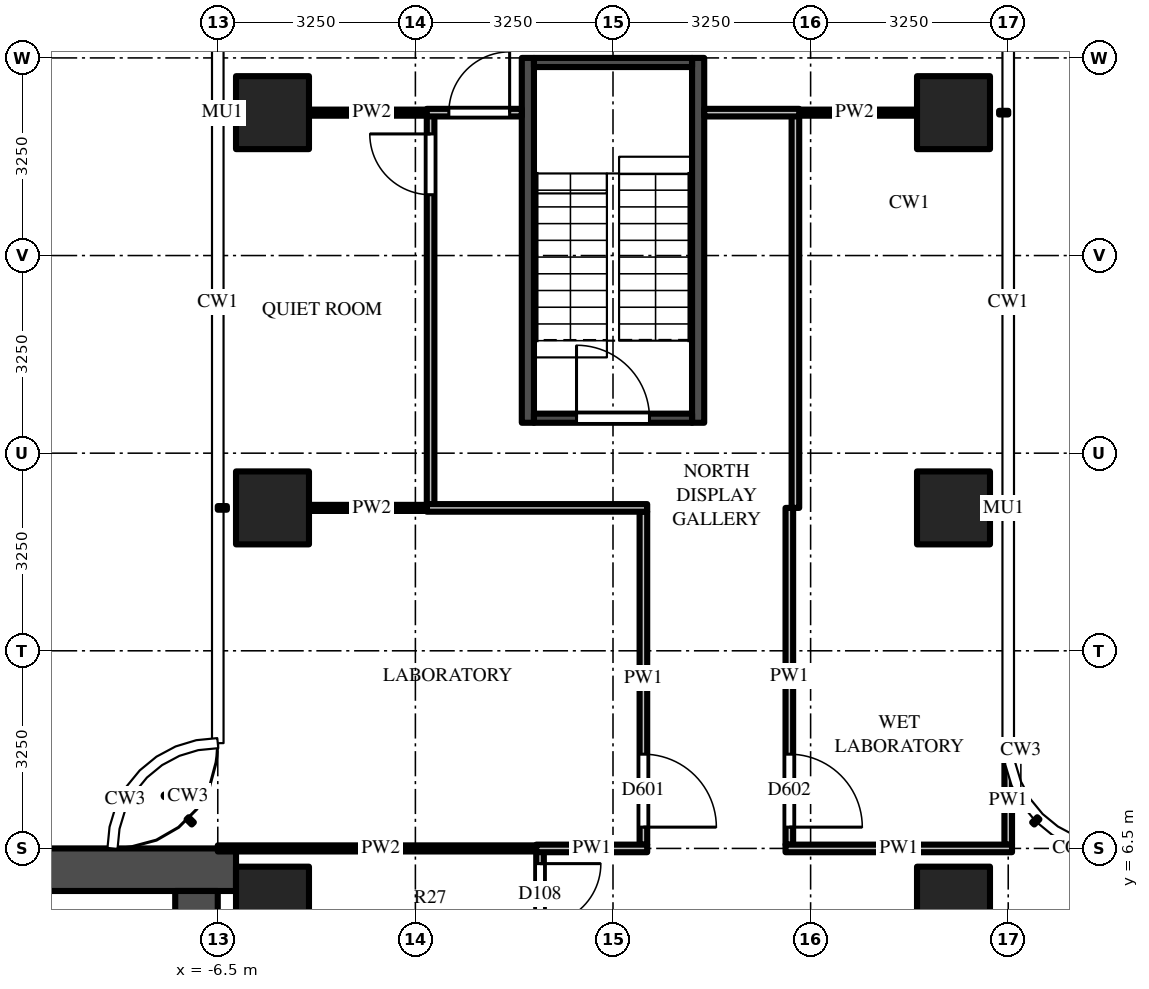
"""IFC4 building model, lengths in metres.
Left out: names, types, materials, properties, quantities, classifications, styles, units other than length and angle.
Written with IfcOpenShell. Run it as: python <this file> out.ifc"""

import sys

from ifc_helpers import new_model, si_unit, direction, frame, frame_2d, origin, origin_2d, place, context, subcontext, project, spatial, rectangle, extrude, source, transform, mapped, element, fill, save


model = new_model("IFC4")
c1 = context("Model", 3, precision=1e-05, world=origin(), true_north=direction((0.0, 1.0)))
c2 = subcontext(c1, "Body", "Model", "MODEL_VIEW")
j1 = project(units=[si_unit("LENGTHUNIT", "METRE"), si_unit("PLANEANGLEUNIT", "RADIAN")], contexts=[c1])
p1 = place(None, origin())
s1 = spatial("IfcSite", under=j1, at=p1, CompositionType="ELEMENT")
p2 = place(p1, origin())
s2 = spatial("IfcBuilding", under=s1, at=p2, CompositionType="ELEMENT")
p3 = place(p2, frame((0.0, 0.0, 165.9)))
s3 = spatial("IfcBuildingStorey", under=s2, at=p3, CompositionType="ELEMENT", Elevation=165.9)
m1 = source(origin(), c2, "Body", "SweptSolid", [
    extrude(rectangle(XDim=1.2, YDim=1.2, at=origin_2d()), origin(), (0.0, 0.0, 1.0), 3.9),
])
for number, where, z_axis, x_axis in (
    (1, (-5.6, 12.1, 0.0), (0.0, 0.0, 1.0), (1.0, 0.0, 0.0)),
    (2, (-5.6, 18.6, 0.0), (0.0, 0.0, 1.0), (1.0, 0.0, 0.0)),
    (3, (5.6, 12.1, 0.0), (0.0, 0.0, 1.0), (1.0, 0.0, 0.0)),
    (4, (5.6, 18.6, 0.0), (0.0, 0.0, 1.0), (1.0, 0.0, 0.0)),
    (5, (5.6, 5.6, 0.0), (0.0, 0.0, 1.0), (1.0, 0.0, 0.0)),
    (6, (-5.6, 5.6, 0.0), (0.0, 0.0, 1.0), (1.0, 0.0, 0.0)),
):
    element("IfcColumn", number, at=place(p3, frame(where, z_axis=z_axis, x_axis=x_axis)), inside=s3, PredefinedType="COLUMN", context=c2, shape_type="MappedRepresentation", body=[
        mapped(m1, transform((0.0, 0.0, 0.0))),
    ])
m2 = source(origin(), c2, "Body", "SweptSolid", [
    extrude(rectangle(XDim=16.55, YDim=0.7, at=frame_2d((8.275, 0.0))), origin(), (0.0, 0.0, 1.0), 3.7),
])
p4 = place(p3, frame((-6.2, 6.15, 0.0), z_axis=(0.0, 0.0, 1.0), x_axis=(-1.0, 0.0, 0.0)))
e7 = element("IfcWall", 7, at=p4, inside=s3, PredefinedType="SHEAR", context=c2, shape_type="MappedRepresentation", body=[
    mapped(m2, transform((0.0, 0.0, 0.0))),
])
m3 = source(origin(), c2, "Body", "SweptSolid", [
    extrude(rectangle(XDim=9.05, YDim=0.7, at=frame_2d((4.525, 0.0))), origin(), (0.0, 0.0, 1.0), 3.7),
])
p5 = place(p3, frame((-6.85, 5.8, 0.0), z_axis=(0.0, 0.0, 1.0), x_axis=(0.0, -1.0, 0.0)))
e8 = element("IfcWall", 8, at=p5, inside=s3, PredefinedType="SHEAR", context=c2, shape_type="MappedRepresentation", body=[
    mapped(m3, transform((0.0, 0.0, 0.0))),
])
m4 = source(origin(), c2, "Body", "SweptSolid", [
    extrude(rectangle(XDim=1.8, YDim=2.1, at=frame_2d((0.9, 1.05))), frame((0.0, 0.36, 0.0), z_axis=(0.0, -1.0, 0.0), x_axis=(1.0, 0.0, 0.0)), (0.0, 0.0, 1.0), 0.72),
])
p6 = place(p5, frame((3.15, 0.0, 0.0)))
e9 = element("IfcOpeningElement", 9, at=p6, cuts=e8, PredefinedType="OPENING", context=c2, shape_type="MappedRepresentation", body=[
    mapped(m4, transform((0.0, 0.0, 0.0))),
])
m5 = source(origin(), c2, "Body", "SweptSolid", [
    extrude(rectangle(XDim=6.0, YDim=0.2, at=frame_2d((3.0, 0.0))), origin(), (0.0, 0.0, 1.0), 3.7),
])
for number, where, z_axis, x_axis in (
    (10, (-1.4, 13.5, 0.0), (0.0, 0.0, 1.0), (0.0, 1.0, 0.0)),
    (11, (1.4, 13.5, 0.0), (0.0, 0.0, 1.0), (0.0, 1.0, 0.0)),
):
    element("IfcWall", number, at=place(p3, frame(where, z_axis=z_axis, x_axis=x_axis)), inside=s3, PredefinedType="SHEAR", context=c2, shape_type="MappedRepresentation", body=[
        mapped(m5, transform((0.0, 0.0, 0.0))),
    ])
m6 = source(origin(), c2, "Body", "SweptSolid", [
    extrude(rectangle(XDim=2.6, YDim=0.15, at=frame_2d((1.3, 0.0))), origin(), (0.0, 0.0, 1.0), 3.7),
])
p7 = place(p3, frame((-1.3, 13.575, 0.0), z_axis=(0.0, 0.0, 1.0), x_axis=(1.0, 0.0, 0.0)))
e12 = element("IfcWall", 12, at=p7, inside=s3, PredefinedType="SHEAR", context=c2, shape_type="MappedRepresentation", body=[
    mapped(m6, transform((0.0, 0.0, 0.0))),
])
m7 = source(origin(), c2, "Body", "SweptSolid", [
    extrude(rectangle(XDim=1.2, YDim=2.1, at=frame_2d((0.6, 1.05))), frame((0.0, 0.085, 0.0), z_axis=(0.0, -1.0, 0.0), x_axis=(1.0, 0.0, 0.0)), (0.0, 0.0, 1.0), 0.17),
])
p8 = place(p7, frame((0.7, 0.0, 0.0)))
e13 = element("IfcOpeningElement", 13, at=p8, cuts=e12, PredefinedType="OPENING", context=c2, shape_type="MappedRepresentation", body=[
    mapped(m7, transform((0.0, 0.0, 0.0))),
])
p9 = place(p3, frame((-1.3, 19.425, 0.0), z_axis=(0.0, 0.0, 1.0), x_axis=(1.0, 0.0, 0.0)))
e14 = element("IfcWall", 14, at=p9, inside=s3, PredefinedType="SHEAR", context=c2, shape_type="MappedRepresentation", body=[
    mapped(m6, transform((0.0, 0.0, 0.0))),
])
m8 = source(origin(), c2, "Body", "SweptSolid", [
    extrude(rectangle(XDim=6.4, YDim=0.125, at=frame_2d((3.2, 0.0))), origin(), (0.0, 0.0, 1.0), 2.997),
])
p10 = place(p3, frame((-3.0, 12.15, 0.0), z_axis=(0.0, 0.0, 1.0), x_axis=(0.0, 1.0, 0.0)))
e15 = element("IfcWall", 15, at=p10, inside=s3, PredefinedType="PARTITIONING", context=c2, shape_type="MappedRepresentation", body=[
    mapped(m8, transform((0.0, 0.0, 0.0))),
])
m9 = source(origin(), c2, "Body", "SweptSolid", [
    extrude(rectangle(XDim=1.0, YDim=2.1, at=frame_2d((0.5, 1.05))), frame((0.0, 0.073, 0.0), z_axis=(0.0, -1.0, 0.0), x_axis=(1.0, 0.0, 0.0)), (0.0, 0.0, 1.0), 0.145),
])
p11 = place(p10, frame((5.1, 0.0, 0.0)))
e16 = element("IfcOpeningElement", 16, at=p11, cuts=e15, PredefinedType="OPENING", context=c2, shape_type="MappedRepresentation", body=[
    mapped(m9, transform((0.0, 0.0, 0.0))),
])
m10 = source(origin(), c2, "Body", "SweptSolid", [
    extrude(rectangle(XDim=3.137, YDim=0.125, at=frame_2d((1.569, 0.0))), origin(), (0.0, 0.0, 1.0), 2.997),
])
p12 = place(p3, frame((-1.2, 6.45, 0.0), z_axis=(0.0, 0.0, 1.0), x_axis=(0.0, -1.0, 0.0)))
e17 = element("IfcWall", 17, at=p12, inside=s3, PredefinedType="PARTITIONING", context=c2, shape_type="MappedRepresentation", body=[
    mapped(m10, transform((0.0, 0.0, 0.0))),
])
p13 = place(p12, frame((0.2, 0.0, 0.0)))
e18 = element("IfcOpeningElement", 18, at=p13, cuts=e17, PredefinedType="OPENING", context=c2, shape_type="MappedRepresentation", body=[
    mapped(m9, transform((0.0, 0.0, 0.0))),
])
m11 = source(origin(), c2, "Body", "SweptSolid", [
    extrude(rectangle(XDim=5.475, YDim=0.125, at=frame_2d((2.738, 0.0))), origin(), (0.0, 0.0, 1.0), 2.997),
])
p14 = place(p3, frame((0.5, 12.038, 0.0), z_axis=(0.0, 0.0, 1.0), x_axis=(0.0, -1.0, 0.0)))
e19 = element("IfcWall", 19, at=p14, inside=s3, PredefinedType="PARTITIONING", context=c2, shape_type="MappedRepresentation", body=[
    mapped(m11, transform((0.0, 0.0, 0.0))),
])
m12 = source(origin(), c2, "Body", "SweptSolid", [
    extrude(rectangle(XDim=1.2, YDim=2.1, at=frame_2d((0.6, 1.05))), frame((0.0, 0.073, 0.0), z_axis=(0.0, -1.0, 0.0), x_axis=(1.0, 0.0, 0.0)), (0.0, 0.0, 1.0), 0.145),
])
p15 = place(p14, frame((3.988, 0.0, 0.0)))
e20 = element("IfcOpeningElement", 20, at=p15, cuts=e19, PredefinedType="OPENING", context=c2, shape_type="MappedRepresentation", body=[
    mapped(m12, transform((0.0, 0.0, 0.0))),
])
m13 = source(origin(), c2, "Body", "SweptSolid", [
    extrude(rectangle(XDim=5.538, YDim=0.125, at=frame_2d((2.769, 0.0))), origin(), (0.0, 0.0, 1.0), 2.997),
])
p16 = place(p3, frame((2.9, 12.1, 0.0), z_axis=(0.0, 0.0, 1.0), x_axis=(0.0, -1.0, 0.0)))
e21 = element("IfcWall", 21, at=p16, inside=s3, PredefinedType="PARTITIONING", context=c2, shape_type="MappedRepresentation", body=[
    mapped(m13, transform((0.0, 0.0, 0.0))),
])
p17 = place(p16, frame((4.05, 0.0, 0.0)))
e22 = element("IfcOpeningElement", 22, at=p17, cuts=e21, PredefinedType="OPENING", context=c2, shape_type="MappedRepresentation", body=[
    mapped(m12, transform((0.0, 0.0, 0.0))),
])
m14 = source(origin(), c2, "Body", "SweptSolid", [
    extrude(rectangle(XDim=6.45, YDim=0.125, at=frame_2d((3.225, 0.0))), origin(), (0.0, 0.0, 1.0), 2.997),
])
p18 = place(p3, frame((3.0, 18.55, 0.0), z_axis=(0.0, 0.0, 1.0), x_axis=(0.0, -1.0, 0.0)))
e23 = element("IfcWall", 23, at=p18, inside=s3, PredefinedType="PARTITIONING", context=c2, shape_type="MappedRepresentation", body=[
    mapped(m14, transform((0.0, 0.0, 0.0))),
])
m15 = source(origin(), c2, "Body", "SweptSolid", [
    extrude(rectangle(XDim=1.469, YDim=0.125, at=frame_2d((0.734, 0.0))), origin(), (0.0, 0.0, 1.0), 3.7),
])
p19 = place(p3, frame((6.5, 6.562, 0.0), z_axis=(0.0, 0.0, 1.0), x_axis=(0.0, 1.0, 0.0)))
e24 = element("IfcWall", 24, at=p19, inside=s3, PredefinedType="PARTITIONING", context=c2, shape_type="MappedRepresentation", body=[
    mapped(m15, transform((0.0, 0.0, 0.0))),
])
m16 = source(origin(), c2, "Body", "SweptSolid", [
    extrude(rectangle(XDim=5.363, YDim=0.1, at=frame_2d((2.681, 0.0))), origin(), (0.0, 0.0, 1.0), 2.78),
])
p20 = place(p3, frame((-6.5, 6.5, 0.0), z_axis=(0.0, 0.0, 1.0), x_axis=(1.0, 0.0, 0.0)))
e25 = element("IfcWall", 25, at=p20, inside=s3, PredefinedType="PARTITIONING", context=c2, shape_type="MappedRepresentation", body=[
    mapped(m16, transform((0.0, 0.0, 0.0))),
])
m17 = source(origin(), c2, "Body", "SweptSolid", [
    extrude(rectangle(XDim=1.825, YDim=0.125, at=frame_2d((0.913, 0.0))), origin(), (0.0, 0.0, 1.0), 3.7),
])
p21 = place(p3, frame((-1.262, 6.5, 0.0), z_axis=(0.0, 0.0, 1.0), x_axis=(1.0, 0.0, 0.0)))
e26 = element("IfcWall", 26, at=p21, inside=s3, PredefinedType="PARTITIONING", context=c2, shape_type="MappedRepresentation", body=[
    mapped(m17, transform((0.0, 0.0, 0.0))),
])
m18 = source(origin(), c2, "Body", "SweptSolid", [
    extrude(rectangle(XDim=3.725, YDim=0.125, at=frame_2d((1.863, 0.0))), origin(), (0.0, 0.0, 1.0), 2.78),
])
p22 = place(p3, frame((2.837, 6.5, 0.0), z_axis=(0.0, 0.0, 1.0), x_axis=(1.0, 0.0, 0.0)))
e27 = element("IfcWall", 27, at=p22, inside=s3, PredefinedType="PARTITIONING", context=c2, shape_type="MappedRepresentation", body=[
    mapped(m18, transform((0.0, 0.0, 0.0))),
])
m19 = source(origin(), c2, "Body", "SweptSolid", [
    extrude(rectangle(XDim=2.062, YDim=0.1, at=frame_2d((1.031, 0.0))), origin(), (0.0, 0.0, 1.0), 2.997),
])
p23 = place(p3, frame((-5.0, 12.1, 0.0), z_axis=(0.0, 0.0, 1.0), x_axis=(1.0, 0.0, 0.0)))
e28 = element("IfcWall", 28, at=p23, inside=s3, PredefinedType="PARTITIONING", context=c2, shape_type="MappedRepresentation", body=[
    mapped(m19, transform((0.0, 0.0, 0.0))),
])
m20 = source(origin(), c2, "Body", "SweptSolid", [
    extrude(rectangle(XDim=3.625, YDim=0.125, at=frame_2d((1.812, 0.0))), origin(), (0.0, 0.0, 1.0), 2.997),
])
p24 = place(p3, frame((0.562, 12.1, 0.0), z_axis=(0.0, 0.0, 1.0), x_axis=(-1.0, 0.0, 0.0)))
e29 = element("IfcWall", 29, at=p24, inside=s3, PredefinedType="PARTITIONING", context=c2, shape_type="MappedRepresentation", body=[
    mapped(m20, transform((0.0, 0.0, 0.0))),
])
m21 = source(origin(), c2, "Body", "SweptSolid", [
    extrude(rectangle(XDim=2.062, YDim=0.1, at=frame_2d((1.031, 0.0))), origin(), (0.0, 0.0, 1.0), 3.223),
])
for number, where, z_axis, x_axis in (
    (30, (-5.0, 18.6, 0.0), (0.0, 0.0, 1.0), (1.0, 0.0, 0.0)),
    (31, (2.938, 18.6, 0.0), (0.0, 0.0, 1.0), (1.0, 0.0, 0.0)),
):
    element("IfcWall", number, at=place(p3, frame(where, z_axis=z_axis, x_axis=x_axis)), inside=s3, PredefinedType="PARTITIONING", context=c2, shape_type="MappedRepresentation", body=[
        mapped(m21, transform((0.0, 0.0, 0.0))),
    ])
m22 = source(origin(), c2, "Body", "SweptSolid", [
    extrude(rectangle(XDim=1.562, YDim=0.125, at=frame_2d((0.781, 0.0))), origin(), (0.0, 0.0, 1.0), 3.223),
])
p25 = place(p3, frame((-3.062, 18.6, 0.0), z_axis=(0.0, 0.0, 1.0), x_axis=(1.0, 0.0, 0.0)))
e32 = element("IfcWall", 32, at=p25, inside=s3, PredefinedType="PARTITIONING", context=c2, shape_type="MappedRepresentation", body=[
    mapped(m22, transform((0.0, 0.0, 0.0))),
])
p26 = place(p25, frame((0.363, 0.0, 0.0)))
e33 = element("IfcOpeningElement", 33, at=p26, cuts=e32, PredefinedType="OPENING", context=c2, shape_type="MappedRepresentation", body=[
    mapped(m9, transform((0.0, 0.0, 0.0))),
])
p27 = place(p3, frame((1.5, 18.6, 0.0), z_axis=(0.0, 0.0, 1.0), x_axis=(1.0, 0.0, 0.0)))
e34 = element("IfcWall", 34, at=p27, inside=s3, PredefinedType="PARTITIONING", context=c2, shape_type="MappedRepresentation", body=[
    mapped(m22, transform((0.0, 0.0, 0.0))),
])
m23 = source(origin(), c2, "Body", "SweptSolid", [
    extrude(rectangle(XDim=1.2, YDim=2.1, at=frame_2d((0.6, 1.05))), frame((0.0, 0.025, 0.0), z_axis=(0.0, -1.0, 0.0), x_axis=(1.0, 0.0, 0.0)), (0.0, 0.0, 1.0), 0.05),
])
p28 = place(p8, origin())
e35 = element("IfcDoor", 35, at=p28, inside=s3, OperationType="SINGLE_SWING_LEFT", PredefinedType="DOOR", context=c2, shape_type="MappedRepresentation", body=[
    mapped(m23, transform((0.0, 0.0, 0.0))),
])
fill(e13, e35)
m24 = source(origin(), c2, "Body", "SweptSolid", [
    extrude(rectangle(XDim=1.0, YDim=2.1, at=frame_2d((0.5, 1.05))), frame((0.0, 0.025, 0.0), z_axis=(0.0, -1.0, 0.0), x_axis=(1.0, 0.0, 0.0)), (0.0, 0.0, 1.0), 0.05),
])
p29 = place(p13, origin())
e36 = element("IfcDoor", 36, at=p29, inside=s3, OperationType="SINGLE_SWING_LEFT", PredefinedType="DOOR", context=c2, shape_type="MappedRepresentation", body=[
    mapped(m24, transform((0.0, 0.0, 0.0))),
])
fill(e18, e36)
p30 = place(p15, origin())
e37 = element("IfcDoor", 37, at=p30, inside=s3, OperationType="SINGLE_SWING_RIGHT", PredefinedType="DOOR", context=c2, shape_type="MappedRepresentation", body=[
    mapped(m23, transform((0.0, 0.0, 0.0))),
])
fill(e20, e37)
p31 = place(p17, origin())
e38 = element("IfcDoor", 38, at=p31, inside=s3, OperationType="SINGLE_SWING_RIGHT", PredefinedType="DOOR", context=c2, shape_type="MappedRepresentation", body=[
    mapped(m23, transform((0.0, 0.0, 0.0))),
])
fill(e22, e38)
p32 = place(p11, origin())
e39 = element("IfcDoor", 39, at=p32, inside=s3, OperationType="SINGLE_SWING_RIGHT", PredefinedType="DOOR", context=c2, shape_type="MappedRepresentation", body=[
    mapped(m24, transform((0.0, 0.0, 0.0))),
])
fill(e16, e39)
p33 = place(p26, origin())
e40 = element("IfcDoor", 40, at=p33, inside=s3, OperationType="SINGLE_SWING_RIGHT", PredefinedType="DOOR", context=c2, shape_type="MappedRepresentation", body=[
    mapped(m24, transform((0.0, 0.0, 0.0))),
])
fill(e33, e40)
save(model, sys.argv[1])
